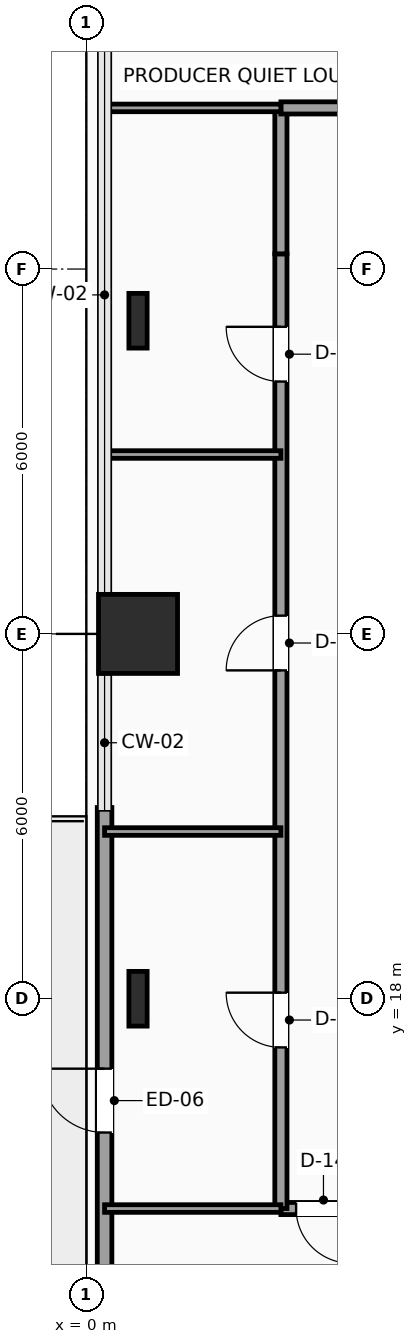
"""IFC4 building model, lengths in metres.
Left out: names, types, materials, properties, quantities, classifications, styles, units other than length and angle.
Written with IfcOpenShell. Run it as: python <this file> out.ifc"""

import sys

from ifc_helpers import new_model, si_unit, direction, frame, frame_2d, origin, origin_2d, place, context, subcontext, project, spatial, rectangle, i_section, extrude, element, fill, save


model = new_model("IFC4")
c1 = context("Model", 3, precision=1e-05, world=origin(), true_north=direction((0.0, 1.0)))
c2 = subcontext(c1, "Body", "Model", "MODEL_VIEW")
j1 = project(units=[si_unit("LENGTHUNIT", "METRE"), si_unit("PLANEANGLEUNIT", "RADIAN")], contexts=[c1])
p1 = place(None, origin())
s1 = spatial("IfcSite", under=j1, at=p1, CompositionType="ELEMENT")
p2 = place(p1, origin())
s2 = spatial("IfcBuilding", under=s1, at=p2, CompositionType="ELEMENT")
p3 = place(p2, frame((0.0, 0.0, 51.9)))
s3 = spatial("IfcBuildingStorey", under=s2, at=p3, CompositionType="ELEMENT", Elevation=51.9)
p4 = place(p3, frame((0.85, 18.0, 0.0), z_axis=(0.0, 0.0, 1.0), x_axis=(1.0, 0.0, 0.0)))
e1 = element("IfcColumn", 1, at=p4, inside=s3, PredefinedType="COLUMN", context=c2, shape_type="SweptSolid", body=[
    extrude(i_section(OverallWidth=0.3, OverallDepth=0.9, WebThickness=0.019, FlangeThickness=0.035, FilletRadius=0.03, at=origin_2d()), origin(), (0.0, 0.0, 1.0), 3.9),
])
p5 = place(p3, frame((0.85, 24.0, 0.0), z_axis=(0.0, 0.0, 1.0), x_axis=(1.0, 0.0, 0.0)))
e2 = element("IfcColumn", 2, at=p5, inside=s3, PredefinedType="COLUMN", context=c2, shape_type="SweptSolid", body=[
    extrude(rectangle(XDim=1.3, YDim=1.3, at=origin_2d()), origin(), (0.0, 0.0, 1.0), 3.9),
])
p6 = place(p3, frame((0.85, 29.15, 0.0), z_axis=(0.0, 0.0, 1.0), x_axis=(1.0, 0.0, 0.0)))
e3 = element("IfcColumn", 3, at=p6, inside=s3, PredefinedType="COLUMN", context=c2, shape_type="SweptSolid", body=[
    extrude(i_section(OverallWidth=0.3, OverallDepth=0.9, WebThickness=0.019, FlangeThickness=0.035, FilletRadius=0.03, at=origin_2d()), origin(), (0.0, 0.0, 1.0), 3.9),
])
p7 = place(p3, frame((0.3, 11.855, 0.0), z_axis=(0.0, 0.0, 1.0), x_axis=(0.0, 1.0, 0.0)))
e4 = element("IfcWall", 4, at=p7, inside=s3, PredefinedType="SOLIDWALL", context=c2, shape_type="SweptSolid", body=[
    extrude(rectangle(XDim=9.29, YDim=0.24, at=frame_2d((4.645, 0.0))), origin(), (0.0, 0.0, 1.0), 3.65),
])
p8 = place(p7, frame((3.945, 0.0, 0.0)))
e5 = element("IfcOpeningElement", 5, at=p8, cuts=e4, PredefinedType="OPENING", context=c2, shape_type="SweptSolid", body=[
    extrude(rectangle(XDim=1.05, YDim=2.2, at=frame_2d((0.525, 1.1))), frame((0.0, 0.13, 0.0), z_axis=(0.0, -1.0, 0.0), x_axis=(1.0, 0.0, 0.0)), (0.0, 0.0, 1.0), 0.26),
])
p9 = place(p3, frame((5.15, 14.55, 0.0), z_axis=(0.0, 0.0, 1.0), x_axis=(-1.0, 0.0, 0.0)))
e6 = element("IfcWall", 6, at=p9, inside=s3, PredefinedType="PARTITIONING", context=c2, shape_type="SweptSolid", body=[
    extrude(rectangle(XDim=1.95, YDim=0.2, at=frame_2d((0.975, 0.0))), origin(), (0.0, 0.0, 1.0), 3.65),
])
p10 = place(p9, frame((0.8, 0.0, 0.0)))
e7 = element("IfcOpeningElement", 7, at=p10, cuts=e6, PredefinedType="OPENING", context=c2, shape_type="SweptSolid", body=[
    extrude(rectangle(XDim=0.9, YDim=2.1, at=frame_2d((0.45, 1.05))), frame((0.0, 0.11, 0.0), z_axis=(0.0, -1.0, 0.0), x_axis=(1.0, 0.0, 0.0)), (0.0, 0.0, 1.0), 0.22),
])
p11 = place(p3, frame((3.2, 14.55, 0.0), z_axis=(0.0, 0.0, 1.0), x_axis=(0.0, 1.0, 0.0)))
e8 = element("IfcWall", 8, at=p11, inside=s3, PredefinedType="PARTITIONING", context=c2, shape_type="SweptSolid", body=[
    extrude(rectangle(XDim=15.7, YDim=0.2, at=frame_2d((7.85, 0.0))), origin(), (0.0, 0.0, 1.0), 3.65),
])
p12 = place(p11, frame((2.65, 0.0, 0.0)))
e9 = element("IfcOpeningElement", 9, at=p12, cuts=e8, PredefinedType="OPENING", context=c2, shape_type="SweptSolid", body=[
    extrude(rectangle(XDim=0.9, YDim=2.1, at=frame_2d((0.45, 1.05))), frame((0.0, 0.11, 0.0), z_axis=(0.0, -1.0, 0.0), x_axis=(1.0, 0.0, 0.0)), (0.0, 0.0, 1.0), 0.22),
])
p13 = place(p11, frame((8.85, 0.0, 0.0)))
e10 = element("IfcOpeningElement", 10, at=p13, cuts=e8, PredefinedType="OPENING", context=c2, shape_type="SweptSolid", body=[
    extrude(rectangle(XDim=0.9, YDim=2.1, at=frame_2d((0.45, 1.05))), frame((0.0, 0.11, 0.0), z_axis=(0.0, -1.0, 0.0), x_axis=(1.0, 0.0, 0.0)), (0.0, 0.0, 1.0), 0.22),
])
p14 = place(p11, frame((13.6, 0.0, 0.0)))
e11 = element("IfcOpeningElement", 11, at=p14, cuts=e8, PredefinedType="OPENING", context=c2, shape_type="SweptSolid", body=[
    extrude(rectangle(XDim=0.9, YDim=2.1, at=frame_2d((0.45, 1.05))), frame((0.0, 0.11, 0.0), z_axis=(0.0, -1.0, 0.0), x_axis=(1.0, 0.0, 0.0)), (0.0, 0.0, 1.0), 0.22),
])
p15 = place(p3, frame((3.2, 30.25, 0.0), z_axis=(0.0, 0.0, 1.0), x_axis=(0.0, 1.0, 0.0)))
e12 = element("IfcWall", 12, at=p15, inside=s3, PredefinedType="PARTITIONING", context=c2, shape_type="SweptSolid", body=[
    extrude(rectangle(XDim=2.4, YDim=0.2, at=frame_2d((1.2, 0.0))), origin(), (0.0, 0.0, 1.0), 3.65),
])
p16 = place(p3, frame((3.2, 32.65, 0.0), z_axis=(0.0, 0.0, 1.0), x_axis=(1.0, 0.0, 0.0)))
e13 = element("IfcWall", 13, at=p16, inside=s3, PredefinedType="PARTITIONING", context=c2, shape_type="SweptSolid", body=[
    extrude(rectangle(XDim=2.05, YDim=0.2, at=frame_2d((1.025, 0.0))), origin(), (0.0, 0.0, 1.0), 3.65),
])
for number, where, z_axis, x_axis in (
    (14, (0.3, 14.55, 0.0), (0.0, 0.0, 1.0), (1.0, 0.0, 0.0)),
    (15, (0.3, 20.75, 0.0), (0.0, 0.0, 1.0), (1.0, 0.0, 0.0)),
    (16, (0.3, 26.95, 0.0), (0.0, 0.0, 1.0), (1.0, 0.0, 0.0)),
    (17, (0.3, 32.65, 0.0), (0.0, 0.0, 1.0), (1.0, 0.0, 0.0)),
):
    element("IfcWall", number, at=place(p3, frame(where, z_axis=z_axis, x_axis=x_axis)), inside=s3, PredefinedType="PARTITIONING", context=c2, shape_type="SweptSolid", body=[
        extrude(rectangle(XDim=2.9, YDim=0.125, at=frame_2d((1.45, 0.0))), origin(), (0.0, 0.0, 1.0), 3.65),
    ])
p17 = place(p8, origin())
e18 = element("IfcDoor", 18, at=p17, inside=s3, OperationType="SINGLE_SWING_RIGHT", PredefinedType="DOOR", context=c2, shape_type="SweptSolid", body=[
    extrude(rectangle(XDim=1.05, YDim=2.2, at=frame_2d((0.525, 1.1))), frame((0.0, 0.025, 0.0), z_axis=(0.0, -1.0, 0.0), x_axis=(1.0, 0.0, 0.0)), (0.0, 0.0, 1.0), 0.05),
])
fill(e5, e18)
p18 = place(p10, origin())
e19 = element("IfcDoor", 19, at=p18, inside=s3, OperationType="SINGLE_SWING_LEFT", PredefinedType="DOOR", context=c2, shape_type="SweptSolid", body=[
    extrude(rectangle(XDim=0.9, YDim=2.1, at=frame_2d((0.45, 1.05))), frame((0.0, 0.025, 0.0), z_axis=(0.0, -1.0, 0.0), x_axis=(1.0, 0.0, 0.0)), (0.0, 0.0, 1.0), 0.05),
])
fill(e7, e19)
p19 = place(p12, origin())
e20 = element("IfcDoor", 20, at=p19, inside=s3, OperationType="SINGLE_SWING_RIGHT", PredefinedType="DOOR", context=c2, shape_type="SweptSolid", body=[
    extrude(rectangle(XDim=0.9, YDim=2.1, at=frame_2d((0.45, 1.05))), frame((0.0, 0.025, 0.0), z_axis=(0.0, -1.0, 0.0), x_axis=(1.0, 0.0, 0.0)), (0.0, 0.0, 1.0), 0.05),
])
fill(e9, e20)
p20 = place(p13, origin())
e21 = element("IfcDoor", 21, at=p20, inside=s3, OperationType="SINGLE_SWING_LEFT", PredefinedType="DOOR", context=c2, shape_type="SweptSolid", body=[
    extrude(rectangle(XDim=0.9, YDim=2.1, at=frame_2d((0.45, 1.05))), frame((0.0, 0.025, 0.0), z_axis=(0.0, -1.0, 0.0), x_axis=(1.0, 0.0, 0.0)), (0.0, 0.0, 1.0), 0.05),
])
fill(e10, e21)
p21 = place(p14, origin())
e22 = element("IfcDoor", 22, at=p21, inside=s3, OperationType="SINGLE_SWING_RIGHT", PredefinedType="DOOR", context=c2, shape_type="SweptSolid", body=[
    extrude(rectangle(XDim=0.9, YDim=2.1, at=frame_2d((0.45, 1.05))), frame((0.0, 0.025, 0.0), z_axis=(0.0, -1.0, 0.0), x_axis=(1.0, 0.0, 0.0)), (0.0, 0.0, 1.0), 0.05),
])
fill(e11, e22)
save(model, sys.argv[1])
